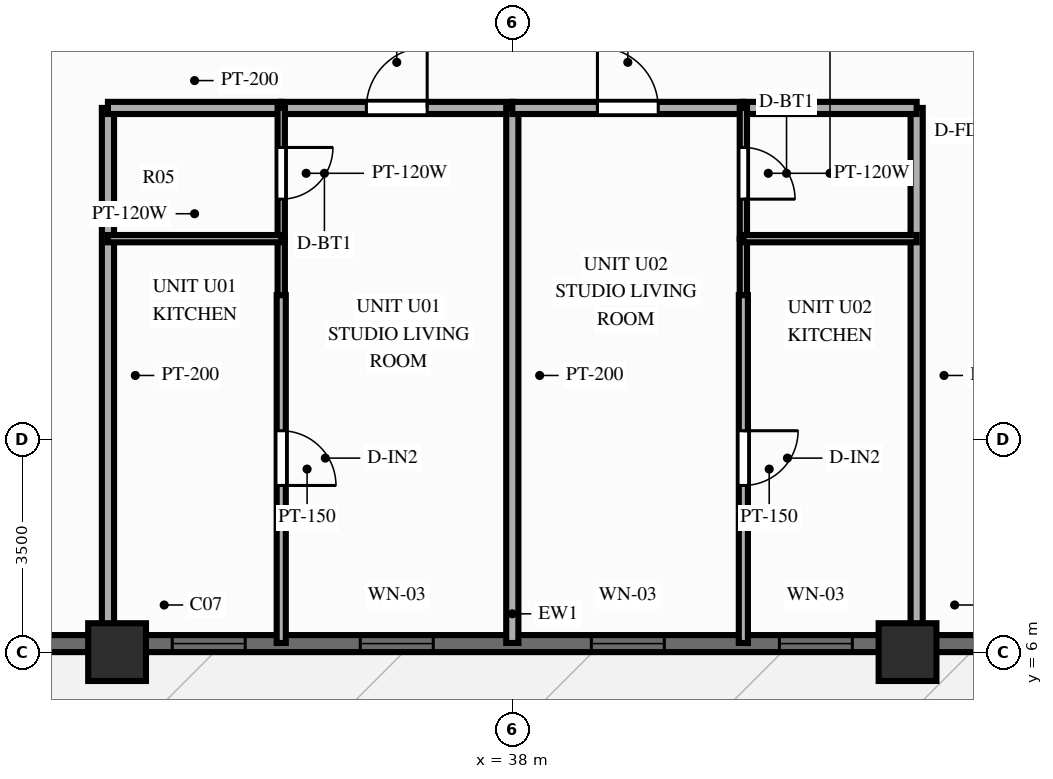
"""IFC4 building model, lengths in metres.
Left out: names, types, materials, properties, quantities, classifications, styles, units other than length and angle.
Written with IfcOpenShell. Run it as: python <this file> out.ifc"""

import sys

from ifc_helpers import new_model, si_unit, direction, frame, frame_2d, origin, origin_2d, place, context, subcontext, project, spatial, rectangle, extrude, source, transform, mapped, element, fill, save


model = new_model("IFC4")
c1 = context("Model", 3, precision=1e-05, world=origin(), true_north=direction((0.0, 1.0)))
c2 = subcontext(c1, "Body", "Model", "MODEL_VIEW")
j1 = project(units=[si_unit("LENGTHUNIT", "METRE"), si_unit("PLANEANGLEUNIT", "RADIAN")], contexts=[c1])
p1 = place(None, origin())
s1 = spatial("IfcSite", under=j1, at=p1, CompositionType="ELEMENT")
p2 = place(p1, origin())
s2 = spatial("IfcBuilding", under=s1, at=p2, CompositionType="ELEMENT")
p3 = place(p2, frame((0.0, 0.0, 156.1)))
s3 = spatial("IfcBuildingStorey", under=s2, at=p3, CompositionType="ELEMENT", Elevation=156.1)
m1 = source(origin(), c2, "Body", "SweptSolid", [
    extrude(rectangle(XDim=0.95, YDim=0.95, at=origin_2d()), origin(), (0.0, 0.0, 1.0), 3.0),
])
for number, where, z_axis, x_axis in (
    (1, (31.5, 6.0, 0.0), (0.0, 0.0, 1.0), (1.0, 0.0, 0.0)),
    (2, (44.5, 6.0, 0.0), (0.0, 0.0, 1.0), (1.0, 0.0, 0.0)),
):
    element("IfcColumn", number, at=place(p3, frame(where, z_axis=z_axis, x_axis=x_axis)), inside=s3, PredefinedType="COLUMN", context=c2, shape_type="MappedRepresentation", body=[
        mapped(m1, transform((0.0, 0.0, 0.0), scale=1.0)),
    ])
p4 = place(p3, frame((21.0, 6.14, 0.0), z_axis=(0.0, 0.0, 1.0), x_axis=(1.0, 0.0, 0.0)))
e3 = element("IfcWall", 3, at=p4, inside=s3, PredefinedType="SOLIDWALL", context=c2, shape_type="SweptSolid", body=[
    extrude(rectangle(XDim=34.0, YDim=0.28, at=frame_2d((17.0, 0.0))), origin(), (0.0, 0.0, 1.0), 2.28),
])
p5 = place(p4, frame((5.8, 0.0, 0.0), z_axis=(0.0, 0.0, 1.0), x_axis=(-1.0, 0.0, 0.0)))
e4 = element("IfcOpeningElement", 4, at=p5, cuts=e3, PredefinedType="OPENING", context=c2, shape_type="SweptSolid", body=[
    extrude(rectangle(XDim=1.1, YDim=2.15, at=frame_2d((0.55, 1.075))), frame((0.0, 0.152, 0.0), z_axis=(0.0, -1.0, 0.0), x_axis=(1.0, 0.0, 0.0)), (0.0, 0.0, 1.0), 0.304),
])
p6 = place(p4, frame((11.407, 0.0, 0.25)))
e5 = element("IfcOpeningElement", 5, at=p6, cuts=e3, PredefinedType="OPENING", context=c2, shape_type="SweptSolid", body=[
    extrude(rectangle(XDim=1.2, YDim=1.5, at=frame_2d((0.6, 0.75))), frame((0.0, 0.152, 0.0), z_axis=(0.0, -1.0, 0.0), x_axis=(1.0, 0.0, 0.0)), (0.0, 0.0, 1.0), 0.304),
])
p7 = place(p4, frame((14.5, 0.0, 0.25)))
e6 = element("IfcOpeningElement", 6, at=p7, cuts=e3, PredefinedType="OPENING", context=c2, shape_type="SweptSolid", body=[
    extrude(rectangle(XDim=1.2, YDim=1.5, at=frame_2d((0.6, 0.75))), frame((0.0, 0.152, 0.0), z_axis=(0.0, -1.0, 0.0), x_axis=(1.0, 0.0, 0.0)), (0.0, 0.0, 1.0), 0.304),
])
p8 = place(p4, frame((18.3, 0.0, 0.25)))
e7 = element("IfcOpeningElement", 7, at=p8, cuts=e3, PredefinedType="OPENING", context=c2, shape_type="SweptSolid", body=[
    extrude(rectangle(XDim=1.2, YDim=1.5, at=frame_2d((0.6, 0.75))), frame((0.0, 0.152, 0.0), z_axis=(0.0, -1.0, 0.0), x_axis=(1.0, 0.0, 0.0)), (0.0, 0.0, 1.0), 0.304),
])
p9 = place(p4, frame((21.393, 0.0, 0.25)))
e8 = element("IfcOpeningElement", 8, at=p9, cuts=e3, PredefinedType="OPENING", context=c2, shape_type="SweptSolid", body=[
    extrude(rectangle(XDim=1.2, YDim=1.5, at=frame_2d((0.6, 0.75))), frame((0.0, 0.152, 0.0), z_axis=(0.0, -1.0, 0.0), x_axis=(1.0, 0.0, 0.0)), (0.0, 0.0, 1.0), 0.304),
])
p10 = place(p4, frame((28.15, 0.0, 0.25)))
e9 = element("IfcOpeningElement", 9, at=p10, cuts=e3, PredefinedType="OPENING", context=c2, shape_type="SweptSolid", body=[
    extrude(rectangle(XDim=1.2, YDim=1.5, at=frame_2d((0.6, 0.75))), frame((0.0, 0.152, 0.0), z_axis=(0.0, -1.0, 0.0), x_axis=(1.0, 0.0, 0.0)), (0.0, 0.0, 1.0), 0.304),
])
for number, where, z_axis, x_axis in (
    (10, (31.35, 14.95, 0.0), (0.0, 0.0, 1.0), (0.0, -1.0, 0.0)),
    (11, (44.65, 14.95, 0.0), (0.0, 0.0, 1.0), (0.0, -1.0, 0.0)),
):
    element("IfcWall", number, at=place(p3, frame(where, z_axis=z_axis, x_axis=x_axis)), inside=s3, PredefinedType="PARTITIONING", context=c2, shape_type="SweptSolid", body=[
        extrude(rectangle(XDim=8.8, YDim=0.2, at=frame_2d((4.4, 0.0))), origin(), (0.0, 0.0, 1.0), 2.34),
    ])
p11 = place(p3, frame((31.35, 14.95, 0.0), z_axis=(0.0, 0.0, 1.0), x_axis=(1.0, 0.0, 0.0)))
e12 = element("IfcWall", 12, at=p11, inside=s3, PredefinedType="PARTITIONING", context=c2, shape_type="SweptSolid", body=[
    extrude(rectangle(XDim=2.85, YDim=0.2, at=frame_2d((1.425, 0.0))), origin(), (0.0, 0.0, 1.0), 2.79),
])
p12 = place(p3, frame((34.2, 14.95, 0.0), z_axis=(0.0, 0.0, 1.0), x_axis=(1.0, 0.0, 0.0)))
e13 = element("IfcWall", 13, at=p12, inside=s3, PredefinedType="PARTITIONING", context=c2, shape_type="SweptSolid", body=[
    extrude(rectangle(XDim=3.8, YDim=0.2, at=frame_2d((1.9, 0.0))), origin(), (0.0, 0.0, 1.0), 2.79),
])
p13 = place(p12, frame((1.4, 0.0, 0.0)))
e14 = element("IfcOpeningElement", 14, at=p13, cuts=e13, PredefinedType="OPENING", context=c2, shape_type="SweptSolid", body=[
    extrude(rectangle(XDim=1.0, YDim=2.15, at=frame_2d((0.5, 1.075))), frame((0.0, 0.112, 0.0), z_axis=(0.0, -1.0, 0.0), x_axis=(1.0, 0.0, 0.0)), (0.0, 0.0, 1.0), 0.224),
])
p14 = place(p3, frame((34.2, 14.95, 0.0), z_axis=(0.0, 0.0, 1.0), x_axis=(0.0, -1.0, 0.0)))
e15 = element("IfcWall", 15, at=p14, inside=s3, PredefinedType="PARTITIONING", context=c2, shape_type="SweptSolid", body=[
    extrude(rectangle(XDim=2.15, YDim=0.12, at=frame_2d((1.075, 0.0))), origin(), (0.0, 0.0, 1.0), 2.79),
])
p15 = place(p14, frame((0.65, 0.0, 0.0)))
e16 = element("IfcOpeningElement", 16, at=p15, cuts=e15, PredefinedType="OPENING", context=c2, shape_type="SweptSolid", body=[
    extrude(rectangle(XDim=0.85, YDim=2.05, at=frame_2d((0.425, 1.025))), frame((0.0, 0.072, 0.0), z_axis=(0.0, -1.0, 0.0), x_axis=(1.0, 0.0, 0.0)), (0.0, 0.0, 1.0), 0.144),
])
p16 = place(p3, frame((34.2, 12.8, 0.0), z_axis=(0.0, 0.0, 1.0), x_axis=(0.0, -1.0, 0.0)))
e17 = element("IfcWall", 17, at=p16, inside=s3, PredefinedType="PARTITIONING", context=c2, shape_type="SweptSolid", body=[
    extrude(rectangle(XDim=0.93, YDim=0.12, at=frame_2d((0.465, 0.0))), origin(), (0.0, 0.0, 1.0), 2.79),
])
p17 = place(p3, frame((31.35, 12.8, 0.0), z_axis=(0.0, 0.0, 1.0), x_axis=(1.0, 0.0, 0.0)))
e18 = element("IfcWall", 18, at=p17, inside=s3, PredefinedType="PARTITIONING", context=c2, shape_type="SweptSolid", body=[
    extrude(rectangle(XDim=2.85, YDim=0.12, at=frame_2d((1.425, 0.0))), origin(), (0.0, 0.0, 1.0), 2.79),
])
p18 = place(p3, frame((34.2, 11.87, 0.0), z_axis=(0.0, 0.0, 1.0), x_axis=(0.0, -1.0, 0.0)))
e19 = element("IfcWall", 19, at=p18, inside=s3, PredefinedType="PARTITIONING", context=c2, shape_type="SweptSolid", body=[
    extrude(rectangle(XDim=5.72, YDim=0.15, at=frame_2d((2.86, 0.0))), origin(), (0.0, 0.0, 1.0), 2.79),
])
p19 = place(p18, frame((2.229, 0.0, 0.0)))
e20 = element("IfcOpeningElement", 20, at=p19, cuts=e19, PredefinedType="OPENING", context=c2, shape_type="SweptSolid", body=[
    extrude(rectangle(XDim=0.9, YDim=2.1, at=frame_2d((0.45, 1.05))), frame((0.0, 0.087, 0.0), z_axis=(0.0, -1.0, 0.0), x_axis=(1.0, 0.0, 0.0)), (0.0, 0.0, 1.0), 0.174),
])
p20 = place(p3, frame((38.0, 14.95, 0.0), z_axis=(0.0, 0.0, 1.0), x_axis=(0.0, -1.0, 0.0)))
e21 = element("IfcWall", 21, at=p20, inside=s3, PredefinedType="PARTITIONING", context=c2, shape_type="SweptSolid", body=[
    extrude(rectangle(XDim=8.8, YDim=0.2, at=frame_2d((4.4, 0.0))), origin(), (0.0, 0.0, 1.0), 2.79),
])
p21 = place(p3, frame((38.0, 14.95, 0.0), z_axis=(0.0, 0.0, 1.0), x_axis=(1.0, 0.0, 0.0)))
e22 = element("IfcWall", 22, at=p21, inside=s3, PredefinedType="PARTITIONING", context=c2, shape_type="SweptSolid", body=[
    extrude(rectangle(XDim=3.8, YDim=0.2, at=frame_2d((1.9, 0.0))), origin(), (0.0, 0.0, 1.0), 2.79),
])
p22 = place(p21, frame((1.4, 0.0, 0.0)))
e23 = element("IfcOpeningElement", 23, at=p22, cuts=e22, PredefinedType="OPENING", context=c2, shape_type="SweptSolid", body=[
    extrude(rectangle(XDim=1.0, YDim=2.15, at=frame_2d((0.5, 1.075))), frame((0.0, 0.112, 0.0), z_axis=(0.0, -1.0, 0.0), x_axis=(1.0, 0.0, 0.0)), (0.0, 0.0, 1.0), 0.224),
])
p23 = place(p3, frame((41.8, 14.95, 0.0), z_axis=(0.0, 0.0, 1.0), x_axis=(1.0, 0.0, 0.0)))
e24 = element("IfcWall", 24, at=p23, inside=s3, PredefinedType="PARTITIONING", context=c2, shape_type="SweptSolid", body=[
    extrude(rectangle(XDim=2.85, YDim=0.2, at=frame_2d((1.425, 0.0))), origin(), (0.0, 0.0, 1.0), 2.79),
])
p24 = place(p3, frame((41.8, 14.95, 0.0), z_axis=(0.0, 0.0, 1.0), x_axis=(0.0, -1.0, 0.0)))
e25 = element("IfcWall", 25, at=p24, inside=s3, PredefinedType="PARTITIONING", context=c2, shape_type="SweptSolid", body=[
    extrude(rectangle(XDim=2.15, YDim=0.12, at=frame_2d((1.075, 0.0))), origin(), (0.0, 0.0, 1.0), 2.79),
])
p25 = place(p24, frame((0.65, 0.0, 0.0)))
e26 = element("IfcOpeningElement", 26, at=p25, cuts=e25, PredefinedType="OPENING", context=c2, shape_type="SweptSolid", body=[
    extrude(rectangle(XDim=0.85, YDim=2.05, at=frame_2d((0.425, 1.025))), frame((0.0, 0.072, 0.0), z_axis=(0.0, -1.0, 0.0), x_axis=(1.0, 0.0, 0.0)), (0.0, 0.0, 1.0), 0.144),
])
p26 = place(p3, frame((41.8, 12.8, 0.0), z_axis=(0.0, 0.0, 1.0), x_axis=(0.0, -1.0, 0.0)))
e27 = element("IfcWall", 27, at=p26, inside=s3, PredefinedType="PARTITIONING", context=c2, shape_type="SweptSolid", body=[
    extrude(rectangle(XDim=0.93, YDim=0.12, at=frame_2d((0.465, 0.0))), origin(), (0.0, 0.0, 1.0), 2.79),
])
p27 = place(p3, frame((41.8, 12.8, 0.0), z_axis=(0.0, 0.0, 1.0), x_axis=(1.0, 0.0, 0.0)))
e28 = element("IfcWall", 28, at=p27, inside=s3, PredefinedType="PARTITIONING", context=c2, shape_type="SweptSolid", body=[
    extrude(rectangle(XDim=2.85, YDim=0.12, at=frame_2d((1.425, 0.0))), origin(), (0.0, 0.0, 1.0), 2.79),
])
p28 = place(p3, frame((41.8, 11.87, 0.0), z_axis=(0.0, 0.0, 1.0), x_axis=(0.0, -1.0, 0.0)))
e29 = element("IfcWall", 29, at=p28, inside=s3, PredefinedType="PARTITIONING", context=c2, shape_type="SweptSolid", body=[
    extrude(rectangle(XDim=5.72, YDim=0.15, at=frame_2d((2.86, 0.0))), origin(), (0.0, 0.0, 1.0), 2.79),
])
p29 = place(p28, frame((2.229, 0.0, 0.0)))
e30 = element("IfcOpeningElement", 30, at=p29, cuts=e29, PredefinedType="OPENING", context=c2, shape_type="SweptSolid", body=[
    extrude(rectangle(XDim=0.9, YDim=2.1, at=frame_2d((0.45, 1.05))), frame((0.0, 0.087, 0.0), z_axis=(0.0, -1.0, 0.0), x_axis=(1.0, 0.0, 0.0)), (0.0, 0.0, 1.0), 0.174),
])
m2 = source(origin(), c2, "Body", "SweptSolid", [
    extrude(rectangle(XDim=1.2, YDim=1.5, at=frame_2d((0.6, 0.75))), frame((0.0, 0.03, 0.0), z_axis=(0.0, -1.0, 0.0), x_axis=(1.0, 0.0, 0.0)), (0.0, 0.0, 1.0), 0.06),
])
p30 = place(p6, origin())
e31 = element("IfcWindow", 31, at=p30, inside=s3, PartitioningType="SINGLE_PANEL", PredefinedType="WINDOW", context=c2, shape_type="MappedRepresentation", body=[
    mapped(m2, transform((0.0, 0.0, 0.0), scale=1.0)),
])
fill(e5, e31)
p31 = place(p7, origin())
e32 = element("IfcWindow", 32, at=p31, inside=s3, PartitioningType="SINGLE_PANEL", PredefinedType="WINDOW", context=c2, shape_type="MappedRepresentation", body=[
    mapped(m2, transform((0.0, 0.0, 0.0), scale=1.0)),
])
fill(e6, e32)
p32 = place(p8, origin())
e33 = element("IfcWindow", 33, at=p32, inside=s3, PartitioningType="SINGLE_PANEL", PredefinedType="WINDOW", context=c2, shape_type="MappedRepresentation", body=[
    mapped(m2, transform((0.0, 0.0, 0.0), scale=1.0)),
])
fill(e7, e33)
p33 = place(p9, origin())
e34 = element("IfcWindow", 34, at=p33, inside=s3, PartitioningType="SINGLE_PANEL", PredefinedType="WINDOW", context=c2, shape_type="MappedRepresentation", body=[
    mapped(m2, transform((0.0, 0.0, 0.0), scale=1.0)),
])
fill(e8, e34)
m3 = source(origin(), c2, "Body", "SweptSolid", [
    extrude(rectangle(XDim=1.0, YDim=2.15, at=frame_2d((0.5, 1.075))), frame((0.0, 0.025, 0.0), z_axis=(0.0, -1.0, 0.0), x_axis=(1.0, 0.0, 0.0)), (0.0, 0.0, 1.0), 0.05),
])
p34 = place(p13, origin())
e35 = element("IfcDoor", 35, at=p34, inside=s3, OperationType="SINGLE_SWING_RIGHT", PredefinedType="DOOR", context=c2, shape_type="MappedRepresentation", body=[
    mapped(m3, transform((0.0, 0.0, 0.0), scale=1.0)),
])
fill(e14, e35)
m4 = source(origin(), c2, "Body", "SweptSolid", [
    extrude(rectangle(XDim=0.85, YDim=2.05, at=frame_2d((0.425, 1.025))), frame((0.0, 0.025, 0.0), z_axis=(0.0, -1.0, 0.0), x_axis=(1.0, 0.0, 0.0)), (0.0, 0.0, 1.0), 0.05),
])
p35 = place(p15, origin())
e36 = element("IfcDoor", 36, at=p35, inside=s3, OperationType="SINGLE_SWING_LEFT", PredefinedType="DOOR", context=c2, shape_type="MappedRepresentation", body=[
    mapped(m4, transform((0.0, 0.0, 0.0), scale=1.0)),
])
fill(e16, e36)
m5 = source(origin(), c2, "Body", "SweptSolid", [
    extrude(rectangle(XDim=0.9, YDim=2.1, at=frame_2d((0.45, 1.05))), frame((0.0, 0.025, 0.0), z_axis=(0.0, -1.0, 0.0), x_axis=(1.0, 0.0, 0.0)), (0.0, 0.0, 1.0), 0.05),
])
p36 = place(p19, origin())
e37 = element("IfcDoor", 37, at=p36, inside=s3, OperationType="SINGLE_SWING_RIGHT", PredefinedType="DOOR", context=c2, shape_type="MappedRepresentation", body=[
    mapped(m5, transform((0.0, 0.0, 0.0), scale=1.0)),
])
fill(e20, e37)
p37 = place(p22, origin())
e38 = element("IfcDoor", 38, at=p37, inside=s3, OperationType="SINGLE_SWING_LEFT", PredefinedType="DOOR", context=c2, shape_type="MappedRepresentation", body=[
    mapped(m3, transform((0.0, 0.0, 0.0), scale=1.0)),
])
fill(e23, e38)
p38 = place(p25, origin())
e39 = element("IfcDoor", 39, at=p38, inside=s3, OperationType="SINGLE_SWING_RIGHT", PredefinedType="DOOR", context=c2, shape_type="MappedRepresentation", body=[
    mapped(m4, transform((0.0, 0.0, 0.0), scale=1.0)),
])
fill(e26, e39)
p39 = place(p29, origin())
e40 = element("IfcDoor", 40, at=p39, inside=s3, OperationType="SINGLE_SWING_LEFT", PredefinedType="DOOR", context=c2, shape_type="MappedRepresentation", body=[
    mapped(m5, transform((0.0, 0.0, 0.0), scale=1.0)),
])
fill(e30, e40)
save(model, sys.argv[1])
